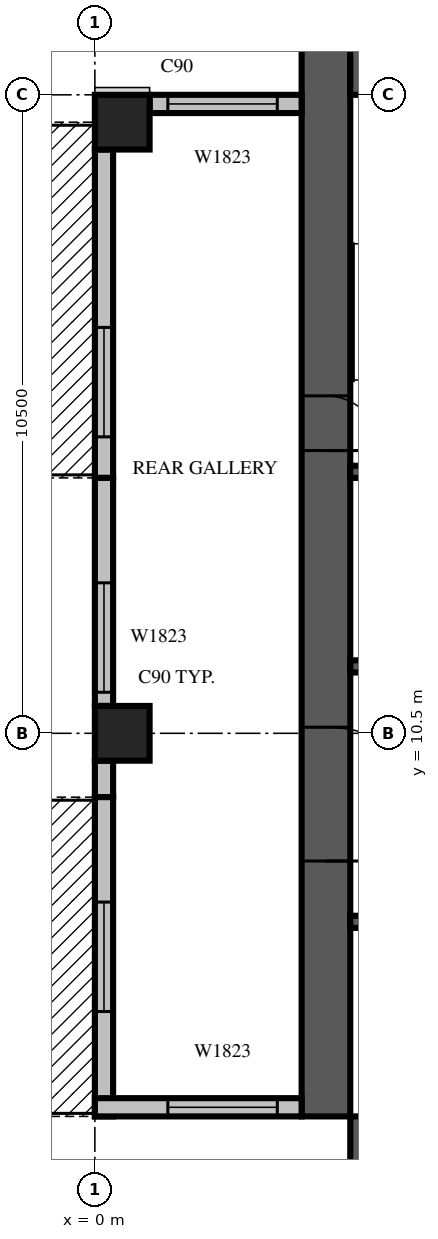
"""IFC4 building model, lengths in metres.
Left out: names, types, materials, properties, quantities, classifications, styles, units other than length and angle.
Written with IfcOpenShell. Run it as: python <this file> out.ifc"""

import sys

from ifc_helpers import new_model, si_unit, direction, frame, frame_2d, origin, origin_2d, place, context, subcontext, project, spatial, rectangle, extrude, source, transform, mapped, element, fill, save


model = new_model("IFC4")
c1 = context("Model", 3, precision=1e-05, world=origin(), true_north=direction((0.0, 1.0)))
c2 = subcontext(c1, "Body", "Model", "MODEL_VIEW")
j1 = project(units=[si_unit("LENGTHUNIT", "METRE"), si_unit("PLANEANGLEUNIT", "RADIAN")], contexts=[c1])
p1 = place(None, origin())
s1 = spatial("IfcSite", under=j1, at=p1, CompositionType="ELEMENT")
p2 = place(p1, origin())
s2 = spatial("IfcBuilding", under=s1, at=p2, CompositionType="ELEMENT")
p3 = place(p2, frame((0.0, 0.0, 208.2)))
s3 = spatial("IfcBuildingStorey", under=s2, at=p3, CompositionType="ELEMENT", Elevation=208.2)
m1 = source(origin(), c2, "Body", "SweptSolid", [
    extrude(rectangle(XDim=0.9, YDim=0.9, at=origin_2d()), origin(), (0.0, 0.0, 1.0), 3.8),
])
for number, where, z_axis, x_axis in (
    (1, (0.45, 10.5, 0.0), (0.0, 0.0, 1.0), (1.0, 0.0, 0.0)),
    (2, (0.45, 20.55, 0.0), (0.0, 0.0, 1.0), (1.0, 0.0, 0.0)),
):
    element("IfcColumn", number, at=place(p3, frame(where, z_axis=z_axis, x_axis=x_axis)), inside=s3, PredefinedType="COLUMN", context=c2, shape_type="MappedRepresentation", body=[
        mapped(m1, transform((0.0, 0.0, 0.0), scale=1.0)),
    ])
m2 = source(origin(), c2, "Body", "SweptSolid", [
    extrude(rectangle(XDim=17.6, YDim=0.8, at=frame_2d((8.8, 0.0))), origin(), (0.0, 0.0, 1.0), 3.8),
])
p4 = place(p3, frame((3.8, 4.2, 0.0), z_axis=(0.0, 0.0, 1.0), x_axis=(0.0, 1.0, 0.0)))
e3 = element("IfcWall", 3, at=p4, inside=s3, PredefinedType="SHEAR", context=c2, shape_type="MappedRepresentation", body=[
    mapped(m2, transform((0.0, 0.0, 0.0), scale=1.0)),
])
m3 = source(origin(), c2, "Body", "SweptSolid", [
    extrude(rectangle(XDim=2.2, YDim=2.1, at=frame_2d((1.1, 1.05))), frame((0.0, 0.41, 0.0), z_axis=(0.0, -1.0, 0.0), x_axis=(1.0, 0.0, 0.0)), (0.0, 0.0, 1.0), 0.82),
])
p5 = place(p4, frame((4.2, 0.0, 0.0)))
e4 = element("IfcOpeningElement", 4, at=p5, cuts=e3, PredefinedType="OPENING", context=c2, shape_type="MappedRepresentation", body=[
    mapped(m3, transform((0.0, 0.0, 0.0), scale=1.0)),
])
m4 = source(origin(), c2, "Body", "SweptSolid", [
    extrude(rectangle(XDim=0.9, YDim=2.1, at=frame_2d((0.45, 1.05))), frame((0.0, 0.41, 0.0), z_axis=(0.0, -1.0, 0.0), x_axis=(1.0, 0.0, 0.0)), (0.0, 0.0, 1.0), 0.82),
])
p6 = place(p4, frame((10.95, 0.0, 0.0)))
e5 = element("IfcOpeningElement", 5, at=p6, cuts=e3, PredefinedType="OPENING", context=c2, shape_type="MappedRepresentation", body=[
    mapped(m4, transform((0.0, 0.0, 0.0), scale=1.0)),
])
p7 = place(p3, frame((4.2, 3.8, 0.0), z_axis=(0.0, 0.0, 1.0), x_axis=(1.0, 0.0, 0.0)))
e6 = element("IfcWall", 6, at=p7, inside=s3, PredefinedType="SHEAR", context=c2, shape_type="MappedRepresentation", body=[
    mapped(m2, transform((0.0, 0.0, 0.0), scale=1.0)),
])
p8 = place(p7, frame((11.55, 0.0, 0.0)))
e7 = element("IfcOpeningElement", 7, at=p8, cuts=e6, PredefinedType="OPENING", context=c2, shape_type="MappedRepresentation", body=[
    mapped(m4, transform((0.0, 0.0, 0.0), scale=1.0)),
])
m5 = source(origin(), c2, "Body", "SweptSolid", [
    extrude(rectangle(XDim=16.8, YDim=0.8, at=frame_2d((8.4, 0.0))), origin(), (0.0, 0.0, 1.0), 3.8),
])
p9 = place(p3, frame((4.2, 21.4, 0.0), z_axis=(0.0, 0.0, 1.0), x_axis=(1.0, 0.0, 0.0)))
e8 = element("IfcWall", 8, at=p9, inside=s3, PredefinedType="SHEAR", context=c2, shape_type="MappedRepresentation", body=[
    mapped(m5, transform((0.0, 0.0, 0.0), scale=1.0)),
])
m6 = source(origin(), c2, "Body", "SweptSolid", [
    extrude(rectangle(XDim=1.2, YDim=2.1, at=frame_2d((0.6, 1.05))), frame((0.0, 0.41, 0.0), z_axis=(0.0, -1.0, 0.0), x_axis=(1.0, 0.0, 0.0)), (0.0, 0.0, 1.0), 0.82),
])
p10 = place(p9, frame((6.2, 0.0, 0.0)))
e9 = element("IfcOpeningElement", 9, at=p10, cuts=e8, PredefinedType="OPENING", context=c2, shape_type="MappedRepresentation", body=[
    mapped(m6, transform((0.0, 0.0, 0.0), scale=1.0)),
])
m7 = source(origin(), c2, "Body", "SweptSolid", [
    extrude(rectangle(XDim=2.5, YDim=0.3, at=frame_2d((1.25, 0.0))), origin(), (0.0, 0.0, 1.0), 3.4),
])
p11 = place(p3, frame((3.4, 20.85, 0.0), z_axis=(0.0, 0.0, 1.0), x_axis=(-1.0, 0.0, 0.0)))
e10 = element("IfcWall", 10, at=p11, inside=s3, PredefinedType="STANDARD", context=c2, shape_type="MappedRepresentation", body=[
    mapped(m7, transform((0.0, 0.0, 0.0), scale=1.0)),
])
m8 = source(origin(), c2, "Body", "SweptSolid", [
    extrude(rectangle(XDim=1.8, YDim=2.3, at=frame_2d((0.9, 1.15))), frame((0.0, 0.16, 0.0), z_axis=(0.0, -1.0, 0.0), x_axis=(1.0, 0.0, 0.0)), (0.0, 0.0, 1.0), 0.32),
])
p12 = place(p11, frame((0.4, 0.0, 0.6)))
e11 = element("IfcOpeningElement", 11, at=p12, cuts=e10, PredefinedType="OPENING", context=c2, shape_type="MappedRepresentation", body=[
    mapped(m8, transform((0.0, 0.0, 0.0), scale=1.0)),
])
p13 = place(p3, frame((0.15, 20.1, 0.0), z_axis=(0.0, 0.0, 1.0), x_axis=(0.0, -1.0, 0.0)))
e12 = element("IfcWall", 12, at=p13, inside=s3, PredefinedType="STANDARD", context=c2, shape_type="SweptSolid", body=[
    extrude(rectangle(XDim=5.4, YDim=0.3, at=frame_2d((2.7, 0.0))), origin(), (0.0, 0.0, 1.0), 3.4),
])
m9 = source(origin(), c2, "Body", "SweptSolid", [
    extrude(rectangle(XDim=1.8, YDim=2.4, at=frame_2d((0.9, 1.2))), frame((0.0, 0.16, 0.0), z_axis=(0.0, -1.0, 0.0), x_axis=(1.0, 0.0, 0.0)), (0.0, 0.0, 1.0), 0.32),
])
p14 = place(p13, frame((2.925, 0.0, 0.0)))
e13 = element("IfcOpeningElement", 13, at=p14, cuts=e12, PredefinedType="OPENING", context=c2, shape_type="MappedRepresentation", body=[
    mapped(m9, transform((0.0, 0.0, 0.0), scale=1.0)),
])
m10 = source(origin(), c2, "Body", "SweptSolid", [
    extrude(rectangle(XDim=3.75, YDim=0.3, at=frame_2d((1.875, 0.0))), origin(), (0.0, 0.0, 1.0), 3.4),
])
p15 = place(p3, frame((0.15, 14.7, 0.0), z_axis=(0.0, 0.0, 1.0), x_axis=(0.0, -1.0, 0.0)))
e14 = element("IfcWall", 14, at=p15, inside=s3, PredefinedType="STANDARD", context=c2, shape_type="MappedRepresentation", body=[
    mapped(m10, transform((0.0, 0.0, 0.0), scale=1.0)),
])
p16 = place(p15, frame((1.725, 0.0, 0.6)))
e15 = element("IfcOpeningElement", 15, at=p16, cuts=e14, PredefinedType="OPENING", context=c2, shape_type="MappedRepresentation", body=[
    mapped(m8, transform((0.0, 0.0, 0.0), scale=1.0)),
])
m11 = source(origin(), c2, "Body", "SweptSolid", [
    extrude(rectangle(XDim=0.6, YDim=0.3, at=frame_2d((0.3, 0.0))), origin(), (0.0, 0.0, 1.0), 3.4),
])
p17 = place(p3, frame((0.15, 10.05, 0.0), z_axis=(0.0, 0.0, 1.0), x_axis=(0.0, -1.0, 0.0)))
e16 = element("IfcWall", 16, at=p17, inside=s3, PredefinedType="STANDARD", context=c2, shape_type="MappedRepresentation", body=[
    mapped(m11, transform((0.0, 0.0, 0.0), scale=1.0)),
])
m12 = source(origin(), c2, "Body", "SweptSolid", [
    extrude(rectangle(XDim=5.25, YDim=0.3, at=frame_2d((2.625, 0.0))), origin(), (0.0, 0.0, 1.0), 3.4),
])
p18 = place(p3, frame((0.15, 9.45, 0.0), z_axis=(0.0, 0.0, 1.0), x_axis=(0.0, -1.0, 0.0)))
e17 = element("IfcWall", 17, at=p18, inside=s3, PredefinedType="STANDARD", context=c2, shape_type="MappedRepresentation", body=[
    mapped(m12, transform((0.0, 0.0, 0.0), scale=1.0)),
])
p19 = place(p18, frame((1.725, 0.0, 0.0)))
e18 = element("IfcOpeningElement", 18, at=p19, cuts=e17, PredefinedType="OPENING", context=c2, shape_type="MappedRepresentation", body=[
    mapped(m9, transform((0.0, 0.0, 0.0), scale=1.0)),
])
m13 = source(origin(), c2, "Body", "SweptSolid", [
    extrude(rectangle(XDim=3.4, YDim=0.3, at=frame_2d((1.7, 0.0))), origin(), (0.0, 0.0, 1.0), 3.4),
])
p20 = place(p3, frame((0.0, 4.35, 0.0), z_axis=(0.0, 0.0, 1.0), x_axis=(1.0, 0.0, 0.0)))
e19 = element("IfcWall", 19, at=p20, inside=s3, PredefinedType="STANDARD", context=c2, shape_type="MappedRepresentation", body=[
    mapped(m13, transform((0.0, 0.0, 0.0), scale=1.0)),
])
p21 = place(p20, frame((1.2, 0.0, 0.6)))
e20 = element("IfcOpeningElement", 20, at=p21, cuts=e19, PredefinedType="OPENING", context=c2, shape_type="MappedRepresentation", body=[
    mapped(m8, transform((0.0, 0.0, 0.0), scale=1.0)),
])
m14 = source(origin(), c2, "Body", "SweptSolid", [
    extrude(rectangle(XDim=9.6, YDim=0.2, at=frame_2d((4.8, 0.0))), origin(), (0.0, 0.0, 1.0), 3.8),
])
p22 = place(p3, frame((4.2, 7.4, 0.0), z_axis=(0.0, 0.0, 1.0), x_axis=(1.0, 0.0, 0.0)))
e21 = element("IfcWall", 21, at=p22, inside=s3, PredefinedType="SOLIDWALL", context=c2, shape_type="MappedRepresentation", body=[
    mapped(m14, transform((0.0, 0.0, 0.0), scale=1.0)),
])
m15 = source(origin(), c2, "Body", "SweptSolid", [
    extrude(rectangle(XDim=1.1, YDim=2.1, at=frame_2d((0.55, 1.05))), frame((0.0, 0.11, 0.0), z_axis=(0.0, -1.0, 0.0), x_axis=(1.0, 0.0, 0.0)), (0.0, 0.0, 1.0), 0.22),
])
p23 = place(p22, frame((0.65, 0.0, 0.0)))
e22 = element("IfcOpeningElement", 22, at=p23, cuts=e21, PredefinedType="OPENING", context=c2, shape_type="MappedRepresentation", body=[
    mapped(m15, transform((0.0, 0.0, 0.0), scale=1.0)),
])
p24 = place(p22, frame((3.05, 0.0, 0.0)))
e23 = element("IfcOpeningElement", 23, at=p24, cuts=e21, PredefinedType="OPENING", context=c2, shape_type="MappedRepresentation", body=[
    mapped(m15, transform((0.0, 0.0, 0.0), scale=1.0)),
])
p25 = place(p22, frame((5.45, 0.0, 0.0)))
e24 = element("IfcOpeningElement", 24, at=p25, cuts=e21, PredefinedType="OPENING", context=c2, shape_type="MappedRepresentation", body=[
    mapped(m15, transform((0.0, 0.0, 0.0), scale=1.0)),
])
p26 = place(p22, frame((7.85, 0.0, 0.0)))
e25 = element("IfcOpeningElement", 25, at=p26, cuts=e21, PredefinedType="OPENING", context=c2, shape_type="MappedRepresentation", body=[
    mapped(m15, transform((0.0, 0.0, 0.0), scale=1.0)),
])
m16 = source(origin(), c2, "Body", "SweptSolid", [
    extrude(rectangle(XDim=4.8, YDim=0.2, at=frame_2d((2.4, 0.0))), origin(), (0.0, 0.0, 1.0), 3.8),
])
p27 = place(p3, frame((4.2, 11.6, 0.0), z_axis=(0.0, 0.0, 1.0), x_axis=(1.0, 0.0, 0.0)))
e26 = element("IfcWall", 26, at=p27, inside=s3, PredefinedType="SOLIDWALL", context=c2, shape_type="MappedRepresentation", body=[
    mapped(m16, transform((0.0, 0.0, 0.0), scale=1.0)),
])
p28 = place(p27, frame((0.65, 0.0, 0.0)))
e27 = element("IfcOpeningElement", 27, at=p28, cuts=e26, PredefinedType="OPENING", context=c2, shape_type="MappedRepresentation", body=[
    mapped(m15, transform((0.0, 0.0, 0.0), scale=1.0)),
])
p29 = place(p27, frame((3.05, 0.0, 0.0)))
e28 = element("IfcOpeningElement", 28, at=p29, cuts=e26, PredefinedType="OPENING", context=c2, shape_type="MappedRepresentation", body=[
    mapped(m15, transform((0.0, 0.0, 0.0), scale=1.0)),
])
p30 = place(p3, frame((4.2, 14.8, 0.0), z_axis=(0.0, 0.0, 1.0), x_axis=(1.0, 0.0, 0.0)))
e29 = element("IfcWall", 29, at=p30, inside=s3, PredefinedType="SOLIDWALL", context=c2, shape_type="MappedRepresentation", body=[
    mapped(m16, transform((0.0, 0.0, 0.0), scale=1.0)),
])
m17 = source(origin(), c2, "Body", "SweptSolid", [
    extrude(rectangle(XDim=1.8, YDim=2.3, at=frame_2d((0.9, 1.15))), frame((0.0, 0.03, 0.0), z_axis=(0.0, -1.0, 0.0), x_axis=(1.0, 0.0, 0.0)), (0.0, 0.0, 1.0), 0.06),
])
p31 = place(p12, origin())
e30 = element("IfcWindow", 30, at=p31, inside=s3, PartitioningType="SINGLE_PANEL", PredefinedType="WINDOW", context=c2, shape_type="MappedRepresentation", body=[
    mapped(m17, transform((0.0, 0.0, 0.0), scale=1.0)),
])
fill(e11, e30)
m18 = source(origin(), c2, "Body", "SweptSolid", [
    extrude(rectangle(XDim=1.8, YDim=2.4, at=frame_2d((0.9, 1.2))), frame((0.0, 0.025, 0.0), z_axis=(0.0, -1.0, 0.0), x_axis=(1.0, 0.0, 0.0)), (0.0, 0.0, 1.0), 0.05),
])
p32 = place(p14, origin())
e31 = element("IfcDoor", 31, at=p32, inside=s3, OperationType="SLIDING_TO_LEFT", PredefinedType="DOOR", context=c2, shape_type="MappedRepresentation", body=[
    mapped(m18, transform((0.0, 0.0, 0.0), scale=1.0)),
])
fill(e13, e31)
p33 = place(p16, origin())
e32 = element("IfcWindow", 32, at=p33, inside=s3, PartitioningType="SINGLE_PANEL", PredefinedType="WINDOW", context=c2, shape_type="MappedRepresentation", body=[
    mapped(m17, transform((0.0, 0.0, 0.0), scale=1.0)),
])
fill(e15, e32)
p34 = place(p19, origin())
e33 = element("IfcDoor", 33, at=p34, inside=s3, OperationType="SLIDING_TO_LEFT", PredefinedType="DOOR", context=c2, shape_type="MappedRepresentation", body=[
    mapped(m18, transform((0.0, 0.0, 0.0), scale=1.0)),
])
fill(e18, e33)
p35 = place(p21, origin())
e34 = element("IfcWindow", 34, at=p35, inside=s3, PartitioningType="SINGLE_PANEL", PredefinedType="WINDOW", context=c2, shape_type="MappedRepresentation", body=[
    mapped(m17, transform((0.0, 0.0, 0.0), scale=1.0)),
])
fill(e20, e34)
m19 = source(origin(), c2, "Body", "SweptSolid", [
    extrude(rectangle(XDim=2.2, YDim=2.1, at=frame_2d((1.1, 1.05))), frame((0.0, 0.025, 0.0), z_axis=(0.0, -1.0, 0.0), x_axis=(1.0, 0.0, 0.0)), (0.0, 0.0, 1.0), 0.05),
])
p36 = place(p5, origin())
e35 = element("IfcDoor", 35, at=p36, inside=s3, OperationType="DOUBLE_DOOR_SINGLE_SWING", PredefinedType="DOOR", context=c2, shape_type="MappedRepresentation", body=[
    mapped(m19, transform((0.0, 0.0, 0.0), scale=1.0)),
])
fill(e4, e35)
m20 = source(origin(), c2, "Body", "SweptSolid", [
    extrude(rectangle(XDim=0.9, YDim=2.1, at=frame_2d((0.45, 1.05))), frame((0.0, 0.025, 0.0), z_axis=(0.0, -1.0, 0.0), x_axis=(1.0, 0.0, 0.0)), (0.0, 0.0, 1.0), 0.05),
])
p37 = place(p6, origin())
e36 = element("IfcDoor", 36, at=p37, inside=s3, OperationType="SINGLE_SWING_RIGHT", PredefinedType="DOOR", context=c2, shape_type="MappedRepresentation", body=[
    mapped(m20, transform((0.0, 0.0, 0.0), scale=1.0)),
])
fill(e5, e36)
save(model, sys.argv[1])
